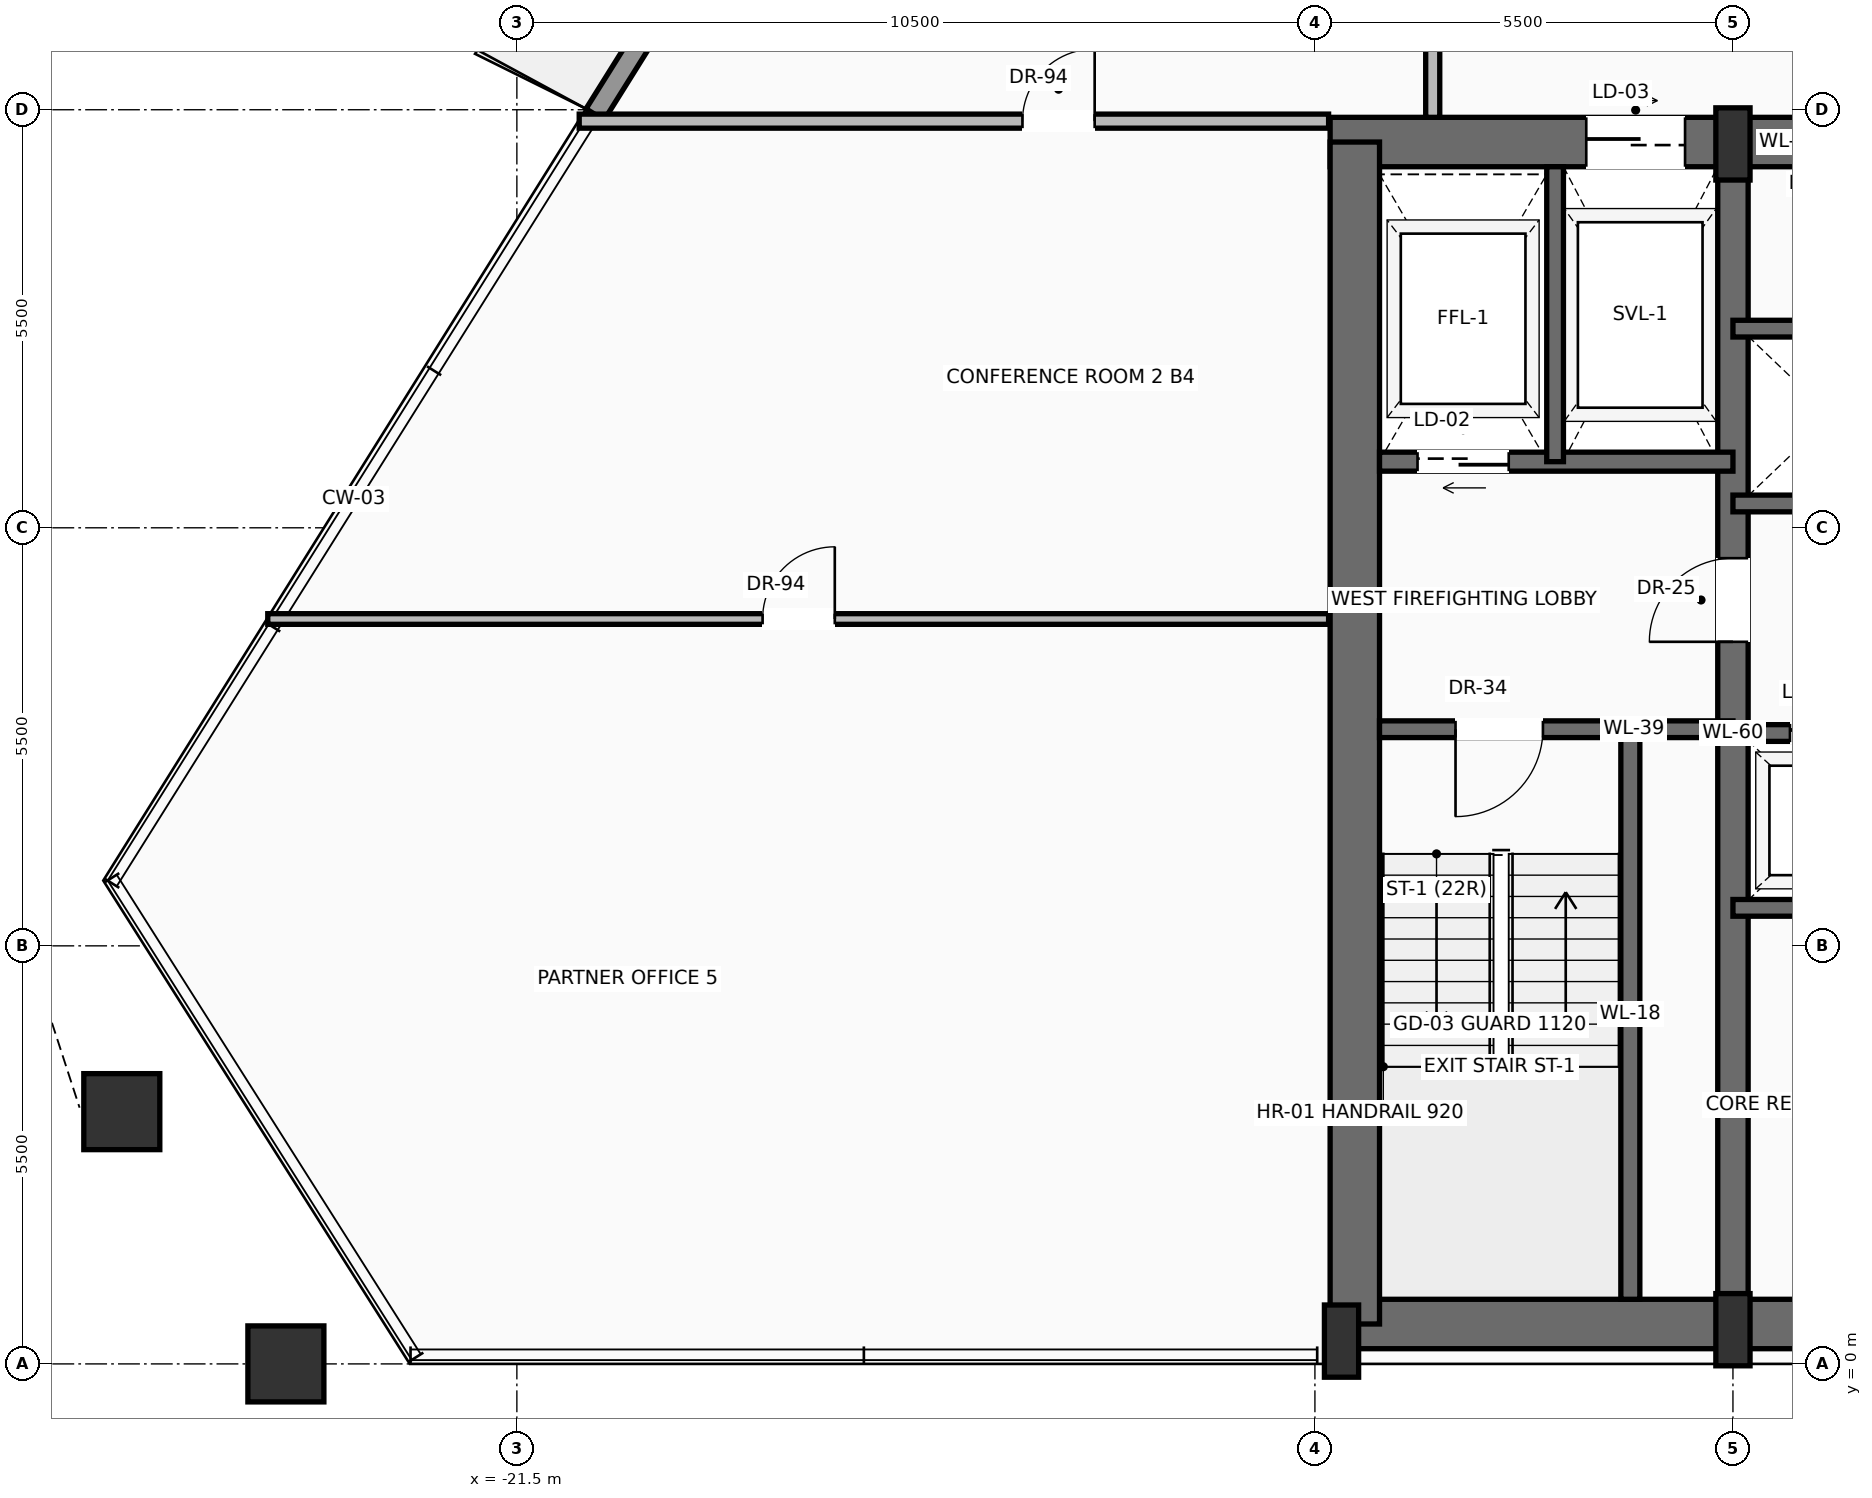
"""IFC4 building model, lengths in metres.
Left out: names, types, materials, properties, quantities, classifications, styles, units other than length and angle.
Written with IfcOpenShell. Run it as: python <this file> out.ifc"""

import sys

from ifc_helpers import new_model, si_unit, direction, frame, frame_2d, origin, origin_2d, place, context, subcontext, project, spatial, rectangle, hollow_rectangle, extrude, source, transform, mapped, element, fill, save


model = new_model("IFC4")
c1 = context("Model", 3, precision=1e-05, world=origin(), true_north=direction((0.0, 1.0)))
c2 = subcontext(c1, "Body", "Model", "MODEL_VIEW")
j1 = project(units=[si_unit("LENGTHUNIT", "METRE"), si_unit("PLANEANGLEUNIT", "RADIAN")], contexts=[c1])
p1 = place(None, origin())
s1 = spatial("IfcSite", under=j1, at=p1, CompositionType="ELEMENT")
p2 = place(p1, origin())
s2 = spatial("IfcBuilding", under=s1, at=p2, CompositionType="ELEMENT")
p3 = place(p2, frame((0.0, 0.0, 178.4)))
s3 = spatial("IfcBuildingStorey", under=s2, at=p3, CompositionType="ELEMENT", Elevation=178.4)
p4 = place(p3, frame((-10.65, 0.525, 0.0), z_axis=(0.0, 0.0, 1.0), x_axis=(1.0, 0.0, 0.0)))
e1 = element("IfcWall", 1, at=p4, inside=s3, PredefinedType="SHEAR", context=c2, shape_type="SweptSolid", body=[
    extrude(rectangle(XDim=21.3, YDim=0.65, at=frame_2d((10.65, 0.0))), origin(), (0.0, 0.0, 1.0), 3.47),
])
p5 = place(p3, frame((-10.8, 16.075, 0.0), z_axis=(0.0, 0.0, 1.0), x_axis=(1.0, 0.0, 0.0)))
e2 = element("IfcWall", 2, at=p5, inside=s3, PredefinedType="SHEAR", context=c2, shape_type="SweptSolid", body=[
    extrude(rectangle(XDim=21.6, YDim=0.65, at=frame_2d((10.8, 0.0))), origin(), (0.0, 0.0, 1.0), 3.47),
])
p6 = place(p5, frame((3.37, 0.0, 0.0)))
e3 = element("IfcOpeningElement", 3, at=p6, cuts=e2, PredefinedType="OPENING", context=c2, shape_type="SweptSolid", body=[
    extrude(rectangle(XDim=1.3, YDim=2.3, at=frame_2d((0.65, 1.15))), frame((0.0, 0.335, 0.0), z_axis=(0.0, -1.0, 0.0), x_axis=(1.0, 0.0, 0.0)), (0.0, 0.0, 1.0), 0.67),
])
p7 = place(p5, frame((9.8, 0.0, 0.0)))
e4 = element("IfcOpeningElement", 4, at=p7, cuts=e2, PredefinedType="OPENING", context=c2, shape_type="SweptSolid", body=[
    extrude(rectangle(XDim=2.0, YDim=2.4, at=frame_2d((1.0, 1.2))), frame((0.0, 0.335, 0.0), z_axis=(0.0, -1.0, 0.0), x_axis=(1.0, 0.0, 0.0)), (0.0, 0.0, 1.0), 0.67),
])
p8 = place(p3, frame((-10.475, 0.525, 0.0), z_axis=(0.0, 0.0, 1.0), x_axis=(0.0, 1.0, 0.0)))
e5 = element("IfcWall", 5, at=p8, inside=s3, PredefinedType="SHEAR", context=c2, shape_type="SweptSolid", body=[
    extrude(rectangle(XDim=15.55, YDim=0.65, at=frame_2d((7.775, 0.0))), origin(), (0.0, 0.0, 1.0), 3.47),
])
p9 = place(p3, frame((-5.5, 0.525, 0.0), z_axis=(0.0, 0.0, 1.0), x_axis=(0.0, 1.0, 0.0)))
e6 = element("IfcWall", 6, at=p9, inside=s3, PredefinedType="SHEAR", context=c2, shape_type="SweptSolid", body=[
    extrude(rectangle(XDim=15.55, YDim=0.4, at=frame_2d((7.775, 0.0))), origin(), (0.0, 0.0, 1.0), 3.47),
])
p10 = place(p9, frame((8.975, 0.0, 0.0)))
e7 = element("IfcOpeningElement", 7, at=p10, cuts=e6, PredefinedType="OPENING", context=c2, shape_type="SweptSolid", body=[
    extrude(rectangle(XDim=1.1, YDim=2.2, at=frame_2d((0.55, 1.1))), frame((0.0, 0.21, 0.0), z_axis=(0.0, -1.0, 0.0), x_axis=(1.0, 0.0, 0.0)), (0.0, 0.0, 1.0), 0.42),
])
m1 = source(origin(), c2, "Body", "SweptSolid", [
    extrude(rectangle(XDim=0.45, YDim=0.95, at=origin_2d()), origin(), (0.0, 0.0, 1.0), 3.7),
])
for number, where, z_axis, x_axis in (
    (8, (-10.65, 0.3, 0.0), (0.0, 0.0, 1.0), (1.0, 0.0, 0.0)),
    (9, (-5.5, 0.45, 0.0), (0.0, 0.0, 1.0), (1.0, 0.0, 0.0)),
    (10, (-5.5, 16.05, 0.0), (0.0, 0.0, 1.0), (1.0, 0.0, 0.0)),
):
    element("IfcColumn", number, at=place(p3, frame(where, z_axis=z_axis, x_axis=x_axis)), inside=s3, PredefinedType="PILASTER", context=c2, shape_type="MappedRepresentation", body=[
        mapped(m1, transform((0.0, 0.0, 0.0), scale=1.0)),
    ])
m2 = source(origin(), c2, "Body", "SweptSolid", [
    extrude(hollow_rectangle(XDim=1.0, YDim=1.0, WallThickness=0.05, at=origin_2d()), origin(), (0.0, 0.0, 1.0), 3.691),
])
p11 = place(p3, frame((-24.539, 0.0, 0.004), z_axis=(-0.007737863577, 0.0, 0.999970062285), x_axis=(0.0, -1.0, 0.0)))
e11 = element("IfcColumn", 11, at=p11, inside=s3, PredefinedType="COLUMN", context=c2, shape_type="MappedRepresentation", body=[
    mapped(m2, transform((0.0, 0.0, 0.0), scale=1.0)),
])
m3 = source(origin(), c2, "Body", "SweptSolid", [
    extrude(hollow_rectangle(XDim=1.0, YDim=1.0, WallThickness=0.05, at=origin_2d()), origin(), (0.0, 0.0, 1.0), 3.692),
])
p12 = place(p3, frame((-26.698, 3.319, 0.004), z_axis=(0.00264517392, -0.015540396781, 0.999875741841), x_axis=(0.985821169784, 0.167799348048, 0.0)))
e12 = element("IfcColumn", 12, at=p12, inside=s3, PredefinedType="COLUMN", context=c2, shape_type="MappedRepresentation", body=[
    mapped(m3, transform((0.0, 0.0, 0.0), scale=1.0)),
])
p13 = place(p3, frame((-20.471, 16.438, 0.0), z_axis=(0.0, 0.0, 1.0), x_axis=(0.530368533609, 0.847767195967, 0.0)))
e13 = element("IfcWall", 13, at=p13, inside=s3, PredefinedType="SOLIDWALL", context=c2, shape_type="SweptSolid", body=[
    extrude(rectangle(XDim=18.82, YDim=0.28, at=frame_2d((9.41, 0.0))), origin(), (0.0, 0.0, 1.0), 3.05),
])
p14 = place(p13, frame((4.517, 0.0, 0.0)))
e14 = element("IfcOpeningElement", 14, at=p14, cuts=e13, PredefinedType="OPENING", context=c2, shape_type="SweptSolid", body=[
    extrude(rectangle(XDim=1.6, YDim=2.35, at=frame_2d((0.8, 1.175))), frame((0.0, 0.15, 0.0), z_axis=(0.0, -1.0, 0.0), x_axis=(1.0, 0.0, 0.0)), (0.0, 0.0, 1.0), 0.3),
])
p15 = place(p13, frame((12.798, 0.0, 0.9)))
e15 = element("IfcOpeningElement", 15, at=p15, cuts=e13, PredefinedType="OPENING", context=c2, shape_type="SweptSolid", body=[
    extrude(rectangle(XDim=1.55, YDim=1.85, at=frame_2d((0.775, 0.925))), frame((0.0, 0.15, 0.0), z_axis=(0.0, -1.0, 0.0), x_axis=(1.0, 0.0, 0.0)), (0.0, 0.0, 1.0), 0.3),
])
p16 = place(p3, frame((-6.85, 0.85, 0.0), z_axis=(0.0, 0.0, 1.0), x_axis=(0.0, 1.0, 0.0)))
e16 = element("IfcWall", 16, at=p16, inside=s3, PredefinedType="SOLIDWALL", context=c2, shape_type="SweptSolid", body=[
    extrude(rectangle(XDim=7.5, YDim=0.25, at=frame_2d((3.75, 0.0))), origin(), (0.0, 0.0, 1.0), 3.47),
])
p17 = place(p3, frame((-5.5, 8.35, 0.0), z_axis=(0.0, 0.0, 1.0), x_axis=(-1.0, 0.0, 0.0)))
e17 = element("IfcWall", 17, at=p17, inside=s3, PredefinedType="SOLIDWALL", context=c2, shape_type="SweptSolid", body=[
    extrude(rectangle(XDim=4.65, YDim=0.22, at=frame_2d((2.325, 0.0))), origin(), (0.0, 0.0, 1.0), 3.47),
])
p18 = place(p17, frame((2.5, 0.0, 0.0)))
e18 = element("IfcOpeningElement", 18, at=p18, cuts=e17, PredefinedType="OPENING", context=c2, shape_type="SweptSolid", body=[
    extrude(rectangle(XDim=1.15, YDim=2.2, at=frame_2d((0.575, 1.1))), frame((0.0, 0.12, 0.0), z_axis=(0.0, -1.0, 0.0), x_axis=(1.0, 0.0, 0.0)), (0.0, 0.0, 1.0), 0.24),
])
p19 = place(p3, frame((-5.5, 11.87, 0.0), z_axis=(0.0, 0.0, 1.0), x_axis=(-1.0, 0.0, 0.0)))
e19 = element("IfcWall", 19, at=p19, inside=s3, PredefinedType="SOLIDWALL", context=c2, shape_type="SweptSolid", body=[
    extrude(rectangle(XDim=4.65, YDim=0.25, at=frame_2d((2.325, 0.0))), origin(), (0.0, 0.0, 1.0), 3.47),
])
p20 = place(p19, frame((2.95, 0.0, 0.0)))
e20 = element("IfcOpeningElement", 20, at=p20, cuts=e19, PredefinedType="OPENING", context=c2, shape_type="SweptSolid", body=[
    extrude(rectangle(XDim=1.2, YDim=2.25, at=frame_2d((0.6, 1.125))), frame((0.0, 0.135, 0.0), z_axis=(0.0, -1.0, 0.0), x_axis=(1.0, 0.0, 0.0)), (0.0, 0.0, 1.0), 0.27),
])
p21 = place(p3, frame((-7.84, 11.87, 0.0), z_axis=(0.0, 0.0, 1.0), x_axis=(0.0, 1.0, 0.0)))
e21 = element("IfcWall", 21, at=p21, inside=s3, PredefinedType="SOLIDWALL", context=c2, shape_type="SweptSolid", body=[
    extrude(rectangle(XDim=3.88, YDim=0.22, at=frame_2d((1.94, 0.0))), origin(), (0.0, 0.0, 1.0), 3.47),
])
p22 = place(p3, frame((-5.5, 6.0, 0.0), z_axis=(0.0, 0.0, 1.0), x_axis=(1.0, 0.0, 0.0)))
e22 = element("IfcWall", 22, at=p22, inside=s3, PredefinedType="SOLIDWALL", context=c2, shape_type="SweptSolid", body=[
    extrude(rectangle(XDim=7.32, YDim=0.22, at=frame_2d((3.66, 0.0))), origin(), (0.0, 0.0, 1.0), 3.47),
])
p23 = place(p3, frame((-5.5, 8.3, 0.0), z_axis=(0.0, 0.0, 1.0), x_axis=(1.0, 0.0, 0.0)))
e23 = element("IfcWall", 23, at=p23, inside=s3, PredefinedType="SOLIDWALL", context=c2, shape_type="SweptSolid", body=[
    extrude(rectangle(XDim=7.32, YDim=0.22, at=frame_2d((3.66, 0.0))), origin(), (0.0, 0.0, 1.0), 3.47),
])
p24 = place(p23, frame((0.75, 0.0, 0.0)))
e24 = element("IfcOpeningElement", 24, at=p24, cuts=e23, PredefinedType="OPENING", context=c2, shape_type="SweptSolid", body=[
    extrude(rectangle(XDim=1.1, YDim=2.2, at=frame_2d((0.55, 1.1))), frame((0.0, 0.12, 0.0), z_axis=(0.0, -1.0, 0.0), x_axis=(1.0, 0.0, 0.0)), (0.0, 0.0, 1.0), 0.24),
])
p25 = place(p23, frame((3.15, 0.0, 0.0)))
e25 = element("IfcOpeningElement", 25, at=p25, cuts=e23, PredefinedType="OPENING", context=c2, shape_type="SweptSolid", body=[
    extrude(rectangle(XDim=1.1, YDim=2.2, at=frame_2d((0.55, 1.1))), frame((0.0, 0.12, 0.0), z_axis=(0.0, -1.0, 0.0), x_axis=(1.0, 0.0, 0.0)), (0.0, 0.0, 1.0), 0.24),
])
p26 = place(p23, frame((5.55, 0.0, 0.0)))
e26 = element("IfcOpeningElement", 26, at=p26, cuts=e23, PredefinedType="OPENING", context=c2, shape_type="SweptSolid", body=[
    extrude(rectangle(XDim=1.1, YDim=2.2, at=frame_2d((0.55, 1.1))), frame((0.0, 0.12, 0.0), z_axis=(0.0, -1.0, 0.0), x_axis=(1.0, 0.0, 0.0)), (0.0, 0.0, 1.0), 0.24),
])
for number, where, z_axis, x_axis in (
    (27, (-5.5, 11.32, 0.0), (0.0, 0.0, 1.0), (1.0, 0.0, 0.0)),
    (28, (-5.5, 13.62, 0.0), (0.0, 0.0, 1.0), (1.0, 0.0, 0.0)),
):
    element("IfcWall", number, at=place(p3, frame(where, z_axis=z_axis, x_axis=x_axis)), inside=s3, PredefinedType="SOLIDWALL", context=c2, shape_type="SweptSolid", body=[
        extrude(rectangle(XDim=7.32, YDim=0.22, at=frame_2d((3.66, 0.0))), origin(), (0.0, 0.0, 1.0), 3.47),
    ])
p27 = place(p3, frame((-9.45, 16.4, 0.0), z_axis=(0.0, 0.0, 1.0), x_axis=(0.0, 1.0, 0.0)))
e29 = element("IfcWall", 29, at=p27, inside=s3, PredefinedType="PARTITIONING", context=c2, shape_type="SweptSolid", body=[
    extrude(rectangle(XDim=9.2, YDim=0.185, at=frame_2d((4.6, 0.0))), origin(), (0.0, 0.0, 1.0), 2.846),
])
p28 = place(p27, frame((3.699, 0.0, 0.0)))
e30 = element("IfcOpeningElement", 30, at=p28, cuts=e29, PredefinedType="OPENING", context=c2, shape_type="SweptSolid", body=[
    extrude(rectangle(XDim=0.95, YDim=2.2, at=frame_2d((0.475, 1.1))), frame((0.0, 0.103, 0.0), z_axis=(0.0, -1.0, 0.0), x_axis=(1.0, 0.0, 0.0)), (0.0, 0.0, 1.0), 0.205),
])
p29 = place(p27, frame((5.987, 0.0, 0.0)))
e31 = element("IfcOpeningElement", 31, at=p29, cuts=e29, PredefinedType="OPENING", context=c2, shape_type="SweptSolid", body=[
    extrude(rectangle(XDim=0.95, YDim=2.2, at=frame_2d((0.475, 1.1))), frame((0.0, 0.103, 0.0), z_axis=(0.0, -1.0, 0.0), x_axis=(1.0, 0.0, 0.0)), (0.0, 0.0, 1.0), 0.205),
])
p30 = place(p3, frame((-20.68, 16.35, 0.0), z_axis=(0.0, 0.0, 1.0), x_axis=(1.0, 0.0, 0.0)))
e32 = element("IfcWall", 32, at=p30, inside=s3, PredefinedType="PARTITIONING", context=c2, shape_type="SweptSolid", body=[
    extrude(rectangle(XDim=9.86, YDim=0.185, at=frame_2d((4.93, 0.0))), origin(), (0.0, 0.0, 1.0), 3.462),
])
p31 = place(p30, frame((5.832, 0.0, 0.0)))
e33 = element("IfcOpeningElement", 33, at=p31, cuts=e32, PredefinedType="OPENING", context=c2, shape_type="SweptSolid", body=[
    extrude(rectangle(XDim=0.95, YDim=2.2, at=frame_2d((0.475, 1.1))), frame((0.0, 0.103, 0.0), z_axis=(0.0, -1.0, 0.0), x_axis=(1.0, 0.0, 0.0)), (0.0, 0.0, 1.0), 0.205),
])
p32 = place(p3, frame((-24.777, 9.8, 0.0), z_axis=(0.0, 0.0, 1.0), x_axis=(1.0, 0.0, 0.0)))
e34 = element("IfcWall", 34, at=p32, inside=s3, PredefinedType="PARTITIONING", context=c2, shape_type="SweptSolid", body=[
    extrude(rectangle(XDim=13.957, YDim=0.14, at=frame_2d((6.979, 0.0))), origin(), (0.0, 0.0, 1.0), 3.049),
])
p33 = place(p32, frame((6.51, 0.0, 0.0)))
e35 = element("IfcOpeningElement", 35, at=p33, cuts=e34, PredefinedType="OPENING", context=c2, shape_type="SweptSolid", body=[
    extrude(rectangle(XDim=0.95, YDim=2.2, at=frame_2d((0.475, 1.1))), frame((0.0, 0.08, 0.0), z_axis=(0.0, -1.0, 0.0), x_axis=(1.0, 0.0, 0.0)), (0.0, 0.0, 1.0), 0.16),
])
m4 = source(origin(), c2, "Body", "SweptSolid", [
    extrude(rectangle(XDim=1.15, YDim=2.2, at=frame_2d((0.575, 1.1))), frame((0.0, 0.025, 0.0), z_axis=(0.0, -1.0, 0.0), x_axis=(1.0, 0.0, 0.0)), (0.0, 0.0, 1.0), 0.05),
])
p34 = place(p18, origin())
e36 = element("IfcDoor", 36, at=p34, inside=s3, OperationType="SINGLE_SWING_RIGHT", PredefinedType="DOOR", context=c2, shape_type="MappedRepresentation", body=[
    mapped(m4, transform((0.0, 0.0, 0.0), scale=1.0)),
])
fill(e18, e36)
m5 = source(origin(), c2, "Body", "SweptSolid", [
    extrude(rectangle(XDim=1.1, YDim=2.2, at=frame_2d((0.55, 1.1))), frame((0.0, 0.025, 0.0), z_axis=(0.0, -1.0, 0.0), x_axis=(1.0, 0.0, 0.0)), (0.0, 0.0, 1.0), 0.05),
])
p35 = place(p10, origin())
e37 = element("IfcDoor", 37, at=p35, inside=s3, OperationType="SINGLE_SWING_LEFT", PredefinedType="DOOR", context=c2, shape_type="MappedRepresentation", body=[
    mapped(m5, transform((0.0, 0.0, 0.0), scale=1.0)),
])
fill(e7, e37)
m6 = source(origin(), c2, "Body", "SweptSolid", [
    extrude(rectangle(XDim=1.2, YDim=2.25, at=frame_2d((0.6, 1.125))), frame((0.0, 0.025, 0.0), z_axis=(0.0, -1.0, 0.0), x_axis=(1.0, 0.0, 0.0)), (0.0, 0.0, 1.0), 0.05),
])
p36 = place(p20, origin())
e38 = element("IfcDoor", 38, at=p36, inside=s3, OperationType="SLIDING_TO_LEFT", PredefinedType="DOOR", context=c2, shape_type="MappedRepresentation", body=[
    mapped(m6, transform((0.0, 0.0, 0.0), scale=1.0)),
])
fill(e20, e38)
m7 = source(origin(), c2, "Body", "SweptSolid", [
    extrude(rectangle(XDim=1.3, YDim=2.3, at=frame_2d((0.65, 1.15))), frame((0.0, 0.025, 0.0), z_axis=(0.0, -1.0, 0.0), x_axis=(1.0, 0.0, 0.0)), (0.0, 0.0, 1.0), 0.05),
])
p37 = place(p6, origin())
e39 = element("IfcDoor", 39, at=p37, inside=s3, OperationType="SLIDING_TO_RIGHT", PredefinedType="DOOR", context=c2, shape_type="MappedRepresentation", body=[
    mapped(m7, transform((0.0, 0.0, 0.0), scale=1.0)),
])
fill(e3, e39)
m8 = source(origin(), c2, "Body", "SweptSolid", [
    extrude(rectangle(XDim=1.1, YDim=2.2, at=frame_2d((0.55, 1.1))), frame((0.0, 0.025, 0.0), z_axis=(0.0, -1.0, 0.0), x_axis=(1.0, 0.0, 0.0)), (0.0, 0.0, 1.0), 0.05),
])
p38 = place(p24, origin())
e40 = element("IfcDoor", 40, at=p38, inside=s3, OperationType="SLIDING_TO_LEFT", PredefinedType="DOOR", context=c2, shape_type="MappedRepresentation", body=[
    mapped(m8, transform((0.0, 0.0, 0.0), scale=1.0)),
])
fill(e24, e40)
m9 = source(origin(), c2, "Body", "SweptSolid", [
    extrude(rectangle(XDim=0.95, YDim=2.2, at=frame_2d((0.475, 1.1))), frame((0.0, 0.025, 0.0), z_axis=(0.0, -1.0, 0.0), x_axis=(1.0, 0.0, 0.0)), (0.0, 0.0, 1.0), 0.05),
])
p39 = place(p31, origin())
e41 = element("IfcDoor", 41, at=p39, inside=s3, OperationType="SINGLE_SWING_RIGHT", PredefinedType="DOOR", context=c2, shape_type="MappedRepresentation", body=[
    mapped(m9, transform((0.0, 0.0, 0.0), scale=1.0)),
])
fill(e33, e41)
p40 = place(p33, origin())
e42 = element("IfcDoor", 42, at=p40, inside=s3, OperationType="SINGLE_SWING_RIGHT", PredefinedType="DOOR", context=c2, shape_type="MappedRepresentation", body=[
    mapped(m9, transform((0.0, 0.0, 0.0), scale=1.0)),
])
fill(e35, e42)
save(model, sys.argv[1])
